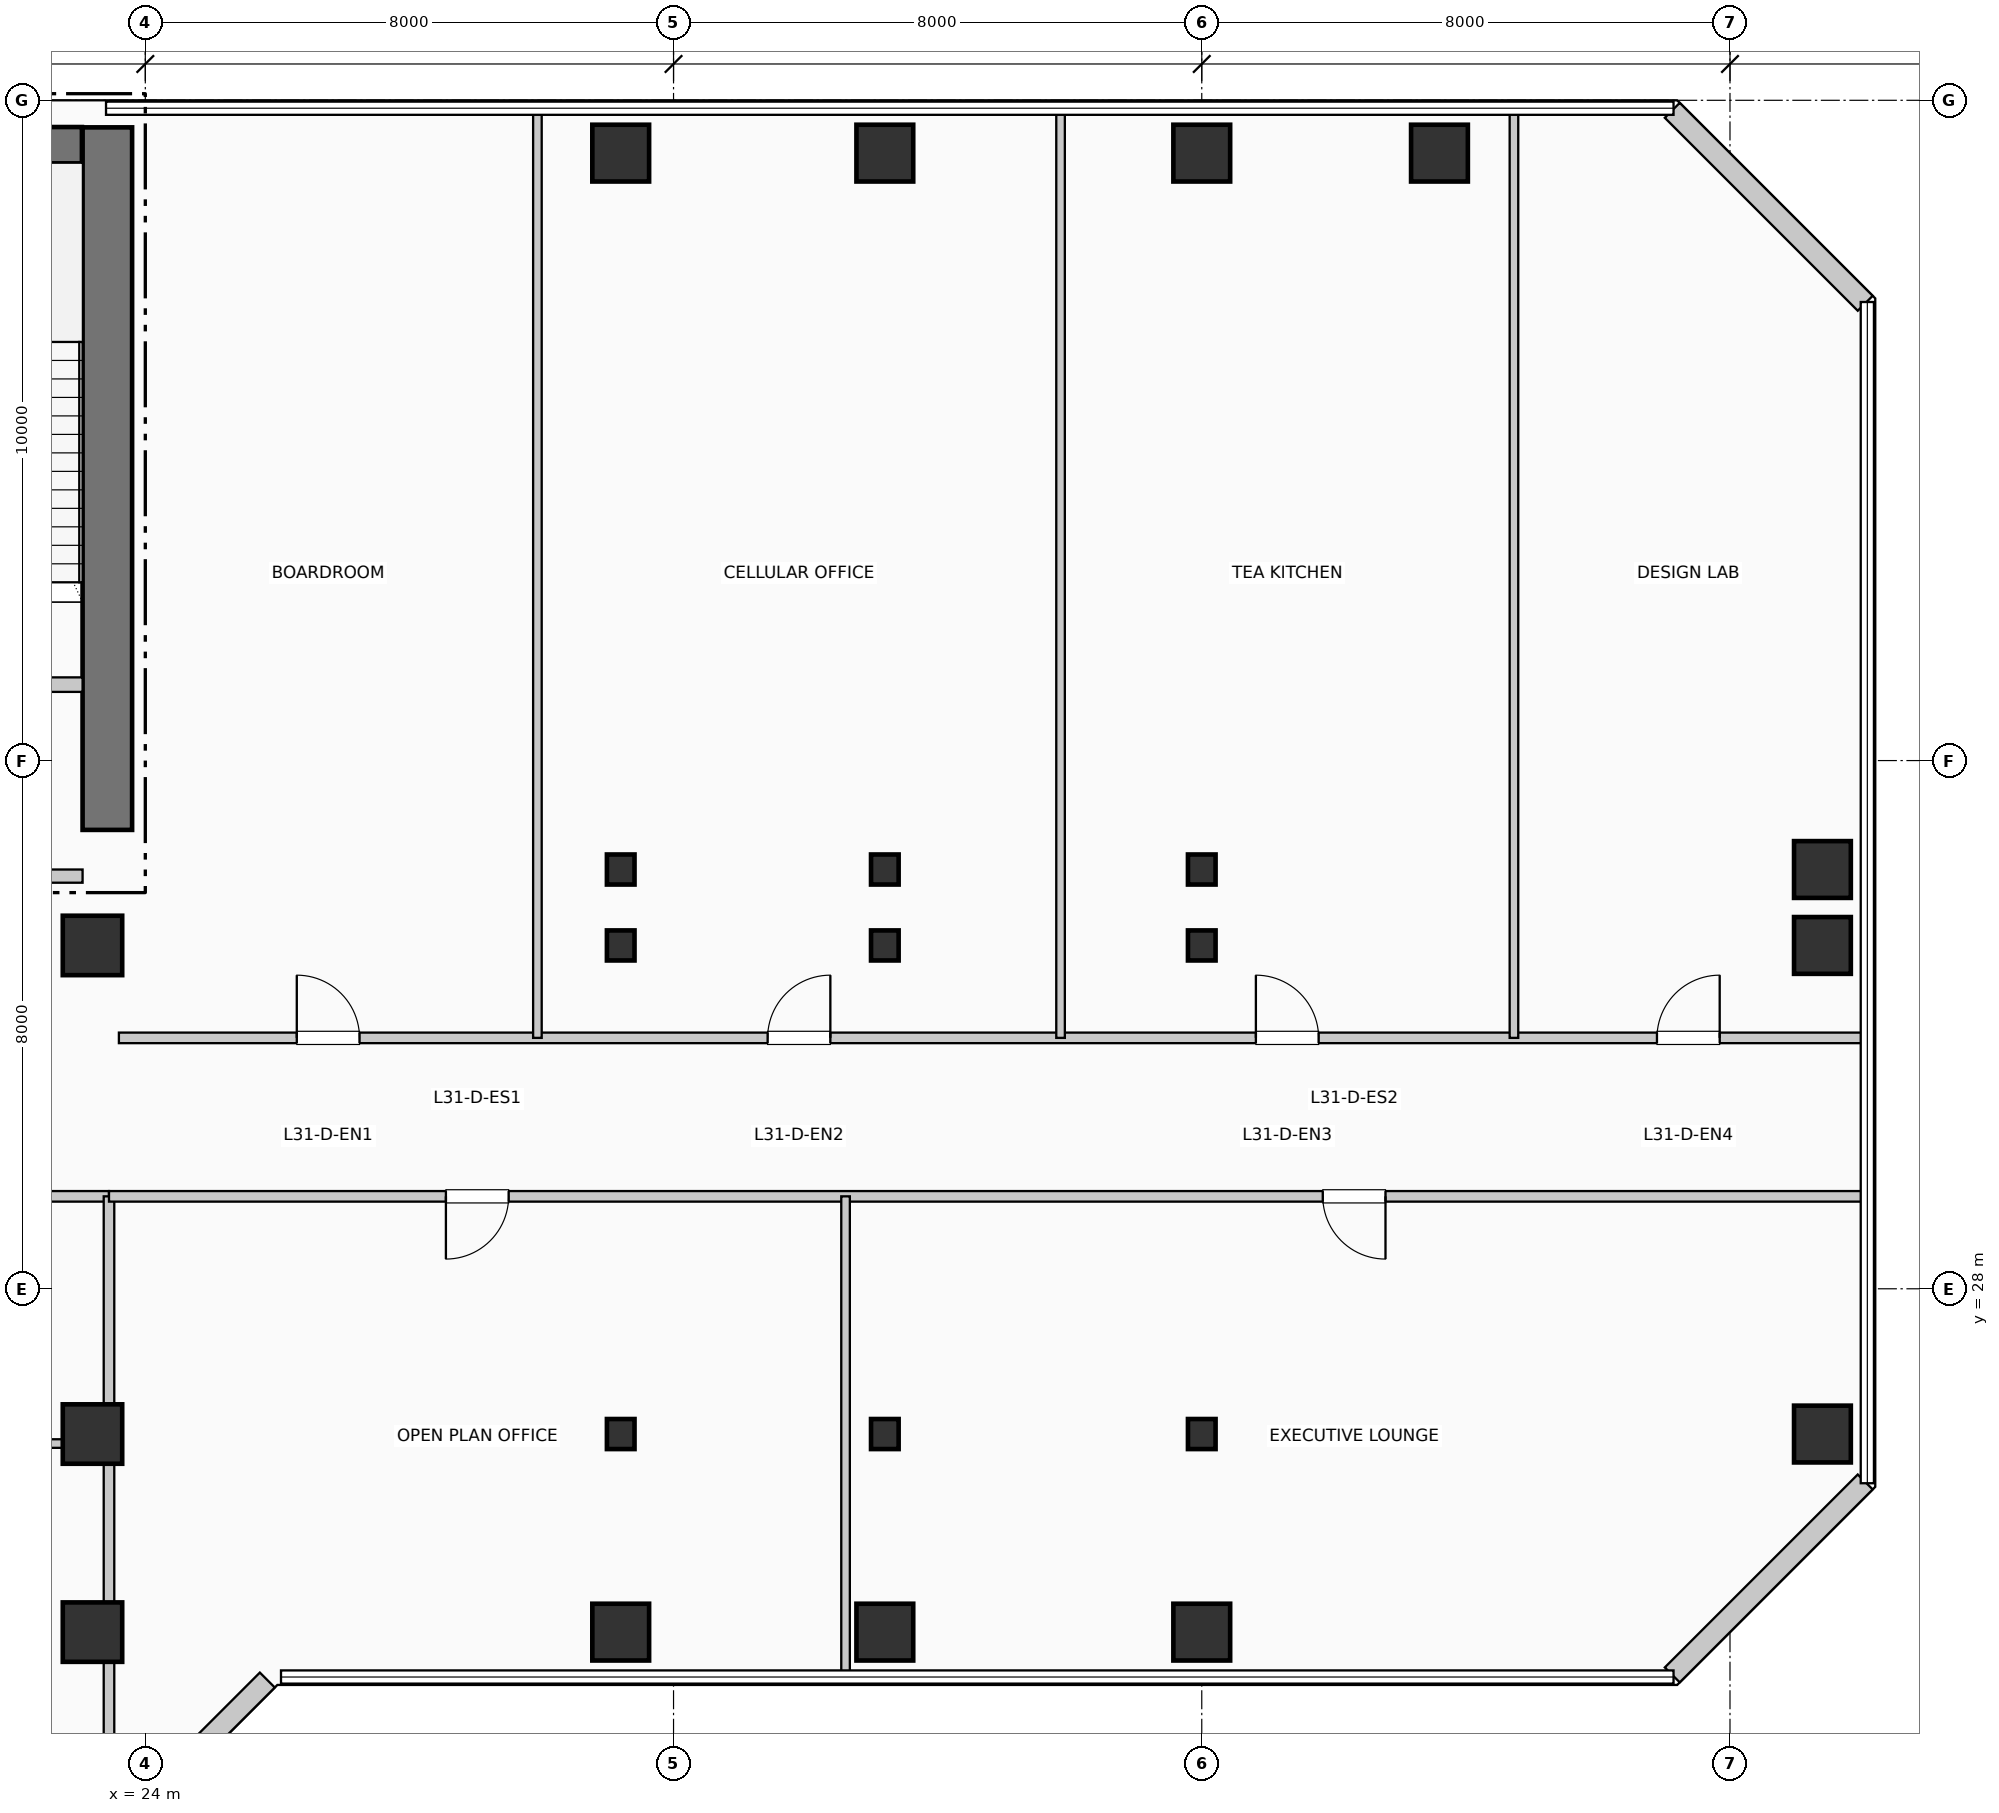
"""IFC4 building model, lengths in metres.
Left out: names, types, materials, properties, quantities, classifications, styles, units other than length and angle.
Written with IfcOpenShell. Run it as: python <this file> out.ifc"""

import sys

from ifc_helpers import new_model, si_unit, direction, frame, frame_2d, origin, origin_2d, place, context, subcontext, project, spatial, rectangle, i_section, extrude, element, fill, save


model = new_model("IFC4")
c1 = context("Model", 3, precision=1e-05, world=origin(), true_north=direction((0.0, 1.0)))
c2 = subcontext(c1, "Body", "Model", "MODEL_VIEW")
j1 = project(units=[si_unit("LENGTHUNIT", "METRE"), si_unit("PLANEANGLEUNIT", "RADIAN")], contexts=[c1])
p1 = place(None, origin())
s1 = spatial("IfcSite", under=j1, at=p1, CompositionType="ELEMENT")
p2 = place(p1, origin())
s2 = spatial("IfcBuilding", under=s1, at=p2, CompositionType="ELEMENT")
p3 = place(p2, frame((0.0, 0.0, 130.35)))
s3 = spatial("IfcBuildingStorey", under=s2, at=p3, CompositionType="ELEMENT", Elevation=130.35)
p4 = place(p3, frame((23.425, 34.95, 0.0), z_axis=(0.0, 0.0, 1.0), x_axis=(0.0, 1.0, 0.0)))
e1 = element("IfcWall", 1, at=p4, inside=s3, PredefinedType="SHEAR", context=c2, shape_type="SweptSolid", body=[
    extrude(rectangle(XDim=10.64, YDim=0.75, at=frame_2d((5.32, 0.0))), origin(), (0.0, 0.0, 1.0), 4.62),
])
p5 = place(p3, frame((19.35, 45.32, 0.0), z_axis=(0.0, 0.0, 1.0), x_axis=(1.0, 0.0, 0.0)))
e2 = element("IfcWall", 2, at=p5, inside=s3, PredefinedType="SHEAR", context=c2, shape_type="SweptSolid", body=[
    extrude(rectangle(XDim=3.69, YDim=0.55, at=frame_2d((1.845, 0.0))), origin(), (0.0, 0.0, 1.0), 4.62),
])
p6 = place(p5, frame((1.15, 0.0, 1.05)))
e3 = element("IfcOpeningElement", 3, at=p6, cuts=e2, PredefinedType="OPENING", context=c2, shape_type="SweptSolid", body=[
    extrude(rectangle(XDim=1.4, YDim=1.8, at=frame_2d((0.7, 0.9))), frame((0.0, 0.285, 0.0), z_axis=(0.0, -1.0, 0.0), x_axis=(1.0, 0.0, 0.0)), (0.0, 0.0, 1.0), 0.57),
])
for number, where, z_axis, x_axis in (
    (4, (23.2, 22.8, 0.0), (0.0, 0.0, 1.0), (1.0, 0.0, 0.0)),
    (5, (23.2, 25.8, 0.0), (0.0, 0.0, 1.0), (1.0, 0.0, 0.0)),
    (6, (23.2, 33.2, 0.0), (0.0, 0.0, 1.0), (1.0, 0.0, 0.0)),
):
    element("IfcColumn", number, at=place(p3, frame(where, z_axis=z_axis, x_axis=x_axis)), inside=s3, PredefinedType="COLUMN", context=c2, shape_type="SweptSolid", body=[
        extrude(rectangle(XDim=0.9, YDim=0.9, at=origin_2d()), origin(), (0.0, 0.0, 1.0), 4.62),
    ])
p7 = place(p3, frame((31.2, 22.8, 0.0), z_axis=(0.0, 0.0, 1.0), x_axis=(1.0, 0.0, 0.0)))
e7 = element("IfcColumn", 7, at=p7, inside=s3, PredefinedType="COLUMN", context=c2, shape_type="SweptSolid", body=[
    extrude(rectangle(XDim=0.86, YDim=0.86, at=origin_2d()), origin(), (0.0, 0.0, 1.0), 4.62),
])
for number, where, z_axis, x_axis in (
    (8, (31.2, 25.8, 0.0), (0.0, 0.0, 1.0), (1.0, 0.0, 0.0)),
    (9, (31.2, 33.2, 0.0), (0.0, 0.0, 1.0), (1.0, 0.0, 0.0)),
    (10, (31.2, 34.35, 0.0), (0.0, 0.0, 1.0), (1.0, 0.0, 0.0)),
):
    element("IfcColumn", number, at=place(p3, frame(where, z_axis=z_axis, x_axis=x_axis)), inside=s3, PredefinedType="COLUMN", context=c2, shape_type="SweptSolid", body=[
        extrude(i_section(OverallWidth=0.418, OverallDepth=0.455, WebThickness=0.032, FlangeThickness=0.051, at=origin_2d()), origin(), (0.0, 0.0, 1.0), 4.62),
    ])
for number, where, z_axis, x_axis in (
    (11, (31.2, 45.2, 0.0), (0.0, 0.0, 1.0), (1.0, 0.0, 0.0)),
    (12, (35.2, 22.8, 0.0), (0.0, 0.0, 1.0), (1.0, 0.0, 0.0)),
):
    element("IfcColumn", number, at=place(p3, frame(where, z_axis=z_axis, x_axis=x_axis)), inside=s3, PredefinedType="COLUMN", context=c2, shape_type="SweptSolid", body=[
        extrude(rectangle(XDim=0.86, YDim=0.86, at=origin_2d()), origin(), (0.0, 0.0, 1.0), 4.62),
    ])
for number, where, z_axis, x_axis in (
    (13, (35.2, 25.8, 0.0), (0.0, 0.0, 1.0), (1.0, 0.0, 0.0)),
    (14, (35.2, 33.2, 0.0), (0.0, 0.0, 1.0), (1.0, 0.0, 0.0)),
    (15, (35.2, 34.35, 0.0), (0.0, 0.0, 1.0), (1.0, 0.0, 0.0)),
):
    element("IfcColumn", number, at=place(p3, frame(where, z_axis=z_axis, x_axis=x_axis)), inside=s3, PredefinedType="COLUMN", context=c2, shape_type="SweptSolid", body=[
        extrude(i_section(OverallWidth=0.418, OverallDepth=0.455, WebThickness=0.032, FlangeThickness=0.051, at=origin_2d()), origin(), (0.0, 0.0, 1.0), 4.62),
    ])
for number, where, z_axis, x_axis in (
    (16, (35.2, 45.2, 0.0), (0.0, 0.0, 1.0), (1.0, 0.0, 0.0)),
    (17, (40.0, 22.8, 0.0), (0.0, 0.0, 1.0), (1.0, 0.0, 0.0)),
):
    element("IfcColumn", number, at=place(p3, frame(where, z_axis=z_axis, x_axis=x_axis)), inside=s3, PredefinedType="COLUMN", context=c2, shape_type="SweptSolid", body=[
        extrude(rectangle(XDim=0.86, YDim=0.86, at=origin_2d()), origin(), (0.0, 0.0, 1.0), 4.62),
    ])
for number, where, z_axis, x_axis in (
    (18, (40.0, 25.8, 0.0), (0.0, 0.0, 1.0), (1.0, 0.0, 0.0)),
    (19, (40.0, 33.2, 0.0), (0.0, 0.0, 1.0), (1.0, 0.0, 0.0)),
    (20, (40.0, 34.35, 0.0), (0.0, 0.0, 1.0), (1.0, 0.0, 0.0)),
):
    element("IfcColumn", number, at=place(p3, frame(where, z_axis=z_axis, x_axis=x_axis)), inside=s3, PredefinedType="COLUMN", context=c2, shape_type="SweptSolid", body=[
        extrude(i_section(OverallWidth=0.418, OverallDepth=0.455, WebThickness=0.032, FlangeThickness=0.051, at=origin_2d()), origin(), (0.0, 0.0, 1.0), 4.62),
    ])
for number, where, z_axis, x_axis in (
    (21, (40.0, 45.2, 0.0), (0.0, 0.0, 1.0), (1.0, 0.0, 0.0)),
    (22, (43.6, 45.2, 0.0), (0.0, 0.0, 1.0), (1.0, 0.0, 0.0)),
    (23, (49.4, 25.8, 0.0), (0.0, 0.0, 1.0), (1.0, 0.0, 0.0)),
    (24, (49.4, 33.2, 0.0), (0.0, 0.0, 1.0), (1.0, 0.0, 0.0)),
    (25, (49.4, 34.35, 0.0), (0.0, 0.0, 1.0), (1.0, 0.0, 0.0)),
):
    element("IfcColumn", number, at=place(p3, frame(where, z_axis=z_axis, x_axis=x_axis)), inside=s3, PredefinedType="COLUMN", context=c2, shape_type="SweptSolid", body=[
        extrude(rectangle(XDim=0.86, YDim=0.86, at=origin_2d()), origin(), (0.0, 0.0, 1.0), 4.62),
    ])
p8 = place(p3, frame((23.926, 20.152, 0.0), z_axis=(0.0, 0.0, 1.0), x_axis=(0.707106781187, 0.707106781187, 0.0)))
e26 = element("IfcWall", 26, at=p8, inside=s3, PredefinedType="SOLIDWALL", context=c2, shape_type="SweptSolid", body=[
    extrude(rectangle(XDim=2.718, YDim=0.32, at=frame_2d((1.359, 0.0))), origin(), (0.0, 0.0, 1.0), 4.37),
])
for number, where, z_axis, x_axis in (
    (27, (47.126, 22.152, 0.0), (0.0, 0.0, 1.0), (0.707, 0.707, 0.0)),
    (28, (50.048, 42.926, 0.0), (0.0, 0.0, 1.0), (-0.707, 0.707, 0.0)),
):
    element("IfcWall", number, at=place(p3, frame(where, z_axis=z_axis, x_axis=x_axis)), inside=s3, PredefinedType="SOLIDWALL", context=c2, shape_type="SweptSolid", body=[
        extrude(rectangle(XDim=4.133, YDim=0.32, at=frame_2d((2.066, 0.0))), origin(), (0.0, 0.0, 1.0), 4.37),
    ])
p9 = place(p3, frame((19.9, 37.15, 0.0), z_axis=(0.0, 0.0, 1.0), x_axis=(1.0, 0.0, 0.0)))
e29 = element("IfcWall", 29, at=p9, inside=s3, PredefinedType="PARTITIONING", context=c2, shape_type="SweptSolid", body=[
    extrude(rectangle(XDim=3.15, YDim=0.22, at=frame_2d((1.575, 0.0))), origin(), (0.0, 0.0, 1.0), 4.37),
])
p10 = place(p9, frame((2.05, 0.0, 0.0), z_axis=(0.0, 0.0, 1.0), x_axis=(-1.0, 0.0, 0.0)))
e30 = element("IfcOpeningElement", 30, at=p10, cuts=e29, PredefinedType="OPENING", context=c2, shape_type="SweptSolid", body=[
    extrude(rectangle(XDim=1.05, YDim=2.15, at=frame_2d((0.525, 1.075))), frame((0.0, 0.12, 0.0), z_axis=(0.0, -1.0, 0.0), x_axis=(1.0, 0.0, 0.0)), (0.0, 0.0, 1.0), 0.24),
])
p11 = place(p3, frame((19.8, 34.25, 0.0), z_axis=(0.0, 0.0, 1.0), x_axis=(1.0, 0.0, 0.0)))
e31 = element("IfcWall", 31, at=p11, inside=s3, PredefinedType="PARTITIONING", context=c2, shape_type="SweptSolid", body=[
    extrude(rectangle(XDim=3.25, YDim=0.2, at=frame_2d((1.625, 0.0))), origin(), (0.0, 0.0, 1.0), 4.37),
])
p12 = place(p11, frame((2.15, 0.0, 0.0), z_axis=(0.0, 0.0, 1.0), x_axis=(-1.0, 0.0, 0.0)))
e32 = element("IfcOpeningElement", 32, at=p12, cuts=e31, PredefinedType="OPENING", context=c2, shape_type="SweptSolid", body=[
    extrude(rectangle(XDim=1.1, YDim=2.15, at=frame_2d((0.55, 1.075))), frame((0.0, 0.11, 0.0), z_axis=(0.0, -1.0, 0.0), x_axis=(1.0, 0.0, 0.0)), (0.0, 0.0, 1.0), 0.22),
])
p13 = place(p3, frame((6.4, 29.4, 0.0), z_axis=(0.0, 0.0, 1.0), x_axis=(1.0, 0.0, 0.0)))
e33 = element("IfcWall", 33, at=p13, inside=s3, PredefinedType="PARTITIONING", context=c2, shape_type="SweptSolid", body=[
    extrude(rectangle(XDim=17.05, YDim=0.16, at=frame_2d((8.525, 0.0))), origin(), (0.0, 0.0, 1.0), 4.025),
])
p14 = place(p3, frame((23.45, 1.04, 0.0), z_axis=(0.0, 0.0, 1.0), x_axis=(0.0, 1.0, 0.0)))
e34 = element("IfcWall", 34, at=p14, inside=s3, PredefinedType="PARTITIONING", context=c2, shape_type="SweptSolid", body=[
    extrude(rectangle(XDim=28.36, YDim=0.16, at=frame_2d((14.18, 0.0))), origin(), (0.0, 0.0, 1.0), 3.705),
])
p15 = place(p3, frame((6.4, 25.656, 0.0), z_axis=(0.0, 0.0, 1.0), x_axis=(1.0, 0.0, 0.0)))
e35 = element("IfcWall", 35, at=p15, inside=s3, PredefinedType="PARTITIONING", context=c2, shape_type="SweptSolid", body=[
    extrude(rectangle(XDim=17.05, YDim=0.13, at=frame_2d((8.525, 0.0))), origin(), (0.0, 0.0, 1.0), 3.705),
])
p16 = place(p3, frame((23.45, 29.4, 0.0), z_axis=(0.0, 0.0, 1.0), x_axis=(1.0, 0.0, 0.0)))
e36 = element("IfcWall", 36, at=p16, inside=s3, PredefinedType="PARTITIONING", context=c2, shape_type="SweptSolid", body=[
    extrude(rectangle(XDim=26.56, YDim=0.16, at=frame_2d((13.28, 0.0))), origin(), (0.0, 0.0, 1.0), 4.025),
])
p17 = place(p16, frame((6.052, 0.0, 0.0), z_axis=(0.0, 0.0, 1.0), x_axis=(-1.0, 0.0, 0.0)))
e37 = element("IfcOpeningElement", 37, at=p17, cuts=e36, PredefinedType="OPENING", context=c2, shape_type="SweptSolid", body=[
    extrude(rectangle(XDim=0.95, YDim=2.15, at=frame_2d((0.475, 1.075))), frame((0.0, 0.09, 0.0), z_axis=(0.0, -1.0, 0.0), x_axis=(1.0, 0.0, 0.0)), (0.0, 0.0, 1.0), 0.18),
])
p18 = place(p16, frame((19.333, 0.0, 0.0), z_axis=(0.0, 0.0, 1.0), x_axis=(-1.0, 0.0, 0.0)))
e38 = element("IfcOpeningElement", 38, at=p18, cuts=e36, PredefinedType="OPENING", context=c2, shape_type="SweptSolid", body=[
    extrude(rectangle(XDim=0.95, YDim=2.15, at=frame_2d((0.475, 1.075))), frame((0.0, 0.09, 0.0), z_axis=(0.0, -1.0, 0.0), x_axis=(1.0, 0.0, 0.0)), (0.0, 0.0, 1.0), 0.18),
])
p19 = place(p3, frame((23.6, 31.8, 0.0), z_axis=(0.0, 0.0, 1.0), x_axis=(1.0, 0.0, 0.0)))
e39 = element("IfcWall", 39, at=p19, inside=s3, PredefinedType="PARTITIONING", context=c2, shape_type="SweptSolid", body=[
    extrude(rectangle(XDim=26.41, YDim=0.16, at=frame_2d((13.205, 0.0))), origin(), (0.0, 0.0, 1.0), 4.37),
])
p20 = place(p19, frame((2.694, 0.0, 0.0)))
e40 = element("IfcOpeningElement", 40, at=p20, cuts=e39, PredefinedType="OPENING", context=c2, shape_type="SweptSolid", body=[
    extrude(rectangle(XDim=0.95, YDim=2.15, at=frame_2d((0.475, 1.075))), frame((0.0, 0.09, 0.0), z_axis=(0.0, -1.0, 0.0), x_axis=(1.0, 0.0, 0.0)), (0.0, 0.0, 1.0), 0.18),
])
p21 = place(p19, frame((9.825, 0.0, 0.0)))
e41 = element("IfcOpeningElement", 41, at=p21, cuts=e39, PredefinedType="OPENING", context=c2, shape_type="SweptSolid", body=[
    extrude(rectangle(XDim=0.95, YDim=2.15, at=frame_2d((0.475, 1.075))), frame((0.0, 0.09, 0.0), z_axis=(0.0, -1.0, 0.0), x_axis=(1.0, 0.0, 0.0)), (0.0, 0.0, 1.0), 0.18),
])
p22 = place(p19, frame((17.22, 0.0, 0.0)))
e42 = element("IfcOpeningElement", 42, at=p22, cuts=e39, PredefinedType="OPENING", context=c2, shape_type="SweptSolid", body=[
    extrude(rectangle(XDim=0.95, YDim=2.15, at=frame_2d((0.475, 1.075))), frame((0.0, 0.09, 0.0), z_axis=(0.0, -1.0, 0.0), x_axis=(1.0, 0.0, 0.0)), (0.0, 0.0, 1.0), 0.18),
])
p23 = place(p19, frame((23.294, 0.0, 0.0)))
e43 = element("IfcOpeningElement", 43, at=p23, cuts=e39, PredefinedType="OPENING", context=c2, shape_type="SweptSolid", body=[
    extrude(rectangle(XDim=0.95, YDim=2.15, at=frame_2d((0.475, 1.075))), frame((0.0, 0.09, 0.0), z_axis=(0.0, -1.0, 0.0), x_axis=(1.0, 0.0, 0.0)), (0.0, 0.0, 1.0), 0.18),
])
p24 = place(p3, frame((34.605, 22.19, 0.0), z_axis=(0.0, 0.0, 1.0), x_axis=(0.0, 1.0, 0.0)))
e44 = element("IfcWall", 44, at=p24, inside=s3, PredefinedType="PARTITIONING", context=c2, shape_type="SweptSolid", body=[
    extrude(rectangle(XDim=7.21, YDim=0.13, at=frame_2d((3.605, 0.0))), origin(), (0.0, 0.0, 1.0), 4.37),
])
for number, where, z_axis, x_axis in (
    (45, (29.938, 31.8, 0.0), (0.0, 0.0, 1.0), (0.0, 1.0, 0.0)),
    (46, (37.861, 31.8, 0.0), (0.0, 0.0, 1.0), (0.0, 1.0, 0.0)),
    (47, (44.728, 31.8, 0.0), (0.0, 0.0, 1.0), (0.0, 1.0, 0.0)),
):
    element("IfcWall", number, at=place(p3, frame(where, z_axis=z_axis, x_axis=x_axis)), inside=s3, PredefinedType="PARTITIONING", context=c2, shape_type="SweptSolid", body=[
        extrude(rectangle(XDim=14.01, YDim=0.13, at=frame_2d((7.005, 0.0))), origin(), (0.0, 0.0, 1.0), 4.37),
    ])
p25 = place(p17, origin())
e48 = element("IfcDoor", 48, at=p25, inside=s3, OperationType="SINGLE_SWING_LEFT", PredefinedType="DOOR", context=c2, shape_type="SweptSolid", body=[
    extrude(rectangle(XDim=0.95, YDim=2.15, at=frame_2d((0.475, 1.075))), frame((0.0, 0.025, 0.0), z_axis=(0.0, -1.0, 0.0), x_axis=(1.0, 0.0, 0.0)), (0.0, 0.0, 1.0), 0.05),
])
fill(e37, e48)
p26 = place(p18, origin())
e49 = element("IfcDoor", 49, at=p26, inside=s3, OperationType="SINGLE_SWING_RIGHT", PredefinedType="DOOR", context=c2, shape_type="SweptSolid", body=[
    extrude(rectangle(XDim=0.95, YDim=2.15, at=frame_2d((0.475, 1.075))), frame((0.0, 0.025, 0.0), z_axis=(0.0, -1.0, 0.0), x_axis=(1.0, 0.0, 0.0)), (0.0, 0.0, 1.0), 0.05),
])
fill(e38, e49)
p27 = place(p20, origin())
e50 = element("IfcDoor", 50, at=p27, inside=s3, OperationType="SINGLE_SWING_LEFT", PredefinedType="DOOR", context=c2, shape_type="SweptSolid", body=[
    extrude(rectangle(XDim=0.95, YDim=2.15, at=frame_2d((0.475, 1.075))), frame((0.0, 0.025, 0.0), z_axis=(0.0, -1.0, 0.0), x_axis=(1.0, 0.0, 0.0)), (0.0, 0.0, 1.0), 0.05),
])
fill(e40, e50)
p28 = place(p21, origin())
e51 = element("IfcDoor", 51, at=p28, inside=s3, OperationType="SINGLE_SWING_RIGHT", PredefinedType="DOOR", context=c2, shape_type="SweptSolid", body=[
    extrude(rectangle(XDim=0.95, YDim=2.15, at=frame_2d((0.475, 1.075))), frame((0.0, 0.025, 0.0), z_axis=(0.0, -1.0, 0.0), x_axis=(1.0, 0.0, 0.0)), (0.0, 0.0, 1.0), 0.05),
])
fill(e41, e51)
p29 = place(p22, origin())
e52 = element("IfcDoor", 52, at=p29, inside=s3, OperationType="SINGLE_SWING_LEFT", PredefinedType="DOOR", context=c2, shape_type="SweptSolid", body=[
    extrude(rectangle(XDim=0.95, YDim=2.15, at=frame_2d((0.475, 1.075))), frame((0.0, 0.025, 0.0), z_axis=(0.0, -1.0, 0.0), x_axis=(1.0, 0.0, 0.0)), (0.0, 0.0, 1.0), 0.05),
])
fill(e42, e52)
p30 = place(p23, origin())
e53 = element("IfcDoor", 53, at=p30, inside=s3, OperationType="SINGLE_SWING_RIGHT", PredefinedType="DOOR", context=c2, shape_type="SweptSolid", body=[
    extrude(rectangle(XDim=0.95, YDim=2.15, at=frame_2d((0.475, 1.075))), frame((0.0, 0.025, 0.0), z_axis=(0.0, -1.0, 0.0), x_axis=(1.0, 0.0, 0.0)), (0.0, 0.0, 1.0), 0.05),
])
fill(e43, e53)
save(model, sys.argv[1])
